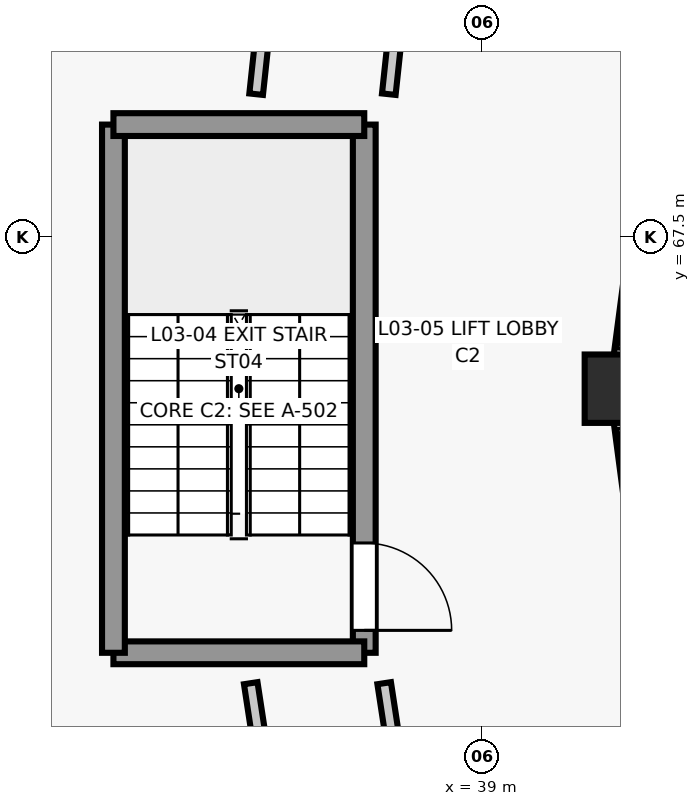
"""IFC4 building model, lengths in metres.
Left out: names, types, materials, properties, quantities, classifications, styles, units other than length and angle.
Written with IfcOpenShell. Run it as: python <this file> out.ifc"""

import sys

from ifc_helpers import new_model, si_unit, direction, frame, frame_2d, origin, origin_2d, place, context, subcontext, project, spatial, rectangle, circle, extrude, element, fill, save


model = new_model("IFC4")
c1 = context("Model", 3, precision=1e-05, world=origin(), true_north=direction((0.0, 1.0)))
c2 = subcontext(c1, "Body", "Model", "MODEL_VIEW")
j1 = project(units=[si_unit("LENGTHUNIT", "METRE"), si_unit("PLANEANGLEUNIT", "RADIAN")], contexts=[c1])
p1 = place(None, origin())
s1 = spatial("IfcSite", under=j1, at=p1, CompositionType="ELEMENT")
p2 = place(p1, origin())
s2 = spatial("IfcBuilding", under=s1, at=p2, CompositionType="ELEMENT")
p3 = place(p2, frame((0.0, 0.0, 12.6)))
s3 = spatial("IfcBuildingStorey", under=s2, at=p3, CompositionType="ELEMENT", Elevation=12.6)
p4 = place(p3, frame((40.8, 65.5, 0.0), z_axis=(0.0, 0.0, 1.0), x_axis=(1.0, 0.0, 0.0)))
e1 = element("IfcColumn", 1, at=p4, inside=s3, PredefinedType="COLUMN", context=c2, shape_type="SweptSolid", body=[
    extrude(circle(Radius=0.45, at=origin_2d()), origin(), (0.0, 0.0, 1.0), 3.9),
])
p5 = place(p3, frame((31.963, 65.975, 0.0), z_axis=(0.0, 0.0, 1.0), x_axis=(0.130513242145, 0.991446566197, 0.0)))
e2 = element("IfcWall", 2, at=p5, inside=s3, PredefinedType="STANDARD", context=c2, shape_type="SweptSolid", body=[
    extrude(rectangle(XDim=11.076, YDim=0.28, at=frame_2d((5.538, 0.0))), origin(), (0.0, 0.0, 1.0), 0.82),
])
p6 = place(p3, frame((42.031, 74.853, 0.0), z_axis=(0.0, 0.0, 1.0), x_axis=(-0.130549698469, -0.991441766434, 0.0)))
e3 = element("IfcWall", 3, at=p6, inside=s3, PredefinedType="STANDARD", context=c2, shape_type="SweptSolid", body=[
    extrude(rectangle(XDim=9.156, YDim=0.25, at=frame_2d((4.578, 0.0))), origin(), (0.0, 0.0, 1.0), 0.82),
])
p7 = place(p3, frame((33.408, 54.044, 0.0), z_axis=(0.0, 0.0, 1.0), x_axis=(-0.130513242145, 0.991446566197, 0.0)))
e4 = element("IfcWall", 4, at=p7, inside=s3, PredefinedType="STANDARD", context=c2, shape_type="SweptSolid", body=[
    extrude(rectangle(XDim=11.076, YDim=0.28, at=frame_2d((5.538, 0.0))), origin(), (0.0, 0.0, 1.0), 2.805),
])
p8 = place(p7, frame((4.563, 0.0, 0.85)))
e5 = element("IfcOpeningElement", 5, at=p8, cuts=e4, PredefinedType="OPENING", context=c2, shape_type="SweptSolid", body=[
    extrude(rectangle(XDim=1.95, YDim=1.55, at=frame_2d((0.975, 0.775))), frame((0.0, 0.15, 0.0), z_axis=(0.0, -1.0, 0.0), x_axis=(1.0, 0.0, 0.0)), (0.0, 0.0, 1.0), 0.3),
])
p9 = place(p3, frame((40.836, 65.225, 0.0), z_axis=(0.0, 0.0, 1.0), x_axis=(0.130549698469, -0.991441766434, 0.0)))
e6 = element("IfcWall", 6, at=p9, inside=s3, PredefinedType="STANDARD", context=c2, shape_type="SweptSolid", body=[
    extrude(rectangle(XDim=9.156, YDim=0.25, at=frame_2d((4.578, 0.0))), origin(), (0.0, 0.0, 1.0), 0.82),
])
p10 = place(p3, frame((37.45, 68.975, 0.0), z_axis=(0.0, 0.0, 1.0), x_axis=(0.0, -1.0, 0.0)))
e7 = element("IfcWall", 7, at=p10, inside=s3, PredefinedType="SHEAR", context=c2, shape_type="SweptSolid", body=[
    extrude(rectangle(XDim=6.95, YDim=0.3, at=frame_2d((3.475, 0.0))), origin(), (0.0, 0.0, 1.0), 3.9),
])
p11 = place(p10, frame((5.505, 0.0, 0.0)))
e8 = element("IfcOpeningElement", 8, at=p11, cuts=e7, PredefinedType="OPENING", context=c2, shape_type="SweptSolid", body=[
    extrude(rectangle(XDim=1.15, YDim=2.15, at=frame_2d((0.575, 1.075))), frame((0.0, 0.16, 0.0), z_axis=(0.0, -1.0, 0.0), x_axis=(1.0, 0.0, 0.0)), (0.0, 0.0, 1.0), 0.32),
])
p12 = place(p3, frame((37.45, 62.025, 0.0), z_axis=(0.0, 0.0, 1.0), x_axis=(-1.0, 0.0, 0.0)))
e9 = element("IfcWall", 9, at=p12, inside=s3, PredefinedType="SHEAR", context=c2, shape_type="SweptSolid", body=[
    extrude(rectangle(XDim=3.3, YDim=0.3, at=frame_2d((1.65, 0.0))), origin(), (0.0, 0.0, 1.0), 3.9),
])
p13 = place(p3, frame((34.15, 62.025, 0.0), z_axis=(0.0, 0.0, 1.0), x_axis=(0.0, 1.0, 0.0)))
e10 = element("IfcWall", 10, at=p13, inside=s3, PredefinedType="SHEAR", context=c2, shape_type="SweptSolid", body=[
    extrude(rectangle(XDim=6.95, YDim=0.3, at=frame_2d((3.475, 0.0))), origin(), (0.0, 0.0, 1.0), 3.9),
])
p14 = place(p3, frame((34.15, 68.975, 0.0), z_axis=(0.0, 0.0, 1.0), x_axis=(1.0, 0.0, 0.0)))
e11 = element("IfcWall", 11, at=p14, inside=s3, PredefinedType="SHEAR", context=c2, shape_type="SweptSolid", body=[
    extrude(rectangle(XDim=3.3, YDim=0.3, at=frame_2d((1.65, 0.0))), origin(), (0.0, 0.0, 1.0), 3.9),
])
p15 = place(p3, frame((36.674, 75.421, 0.0), z_axis=(0.0, 0.0, 1.0), x_axis=(-0.106354502234, -0.994328275699, 0.0)))
e12 = element("IfcWall", 12, at=p15, inside=s3, PredefinedType="PARTITIONING", context=c2, shape_type="SweptSolid", body=[
    extrude(rectangle(XDim=6.081, YDim=0.18, at=frame_2d((3.041, 0.0))), origin(), (0.0, 0.0, 1.0), 3.595),
])
p16 = place(p15, frame((2.44, 0.0, 0.0)))
e13 = element("IfcOpeningElement", 13, at=p16, cuts=e12, PredefinedType="OPENING", context=c2, shape_type="SweptSolid", body=[
    extrude(rectangle(XDim=1.2, YDim=2.15, at=frame_2d((0.6, 1.075))), frame((0.0, 0.1, 0.0), z_axis=(0.0, -1.0, 0.0), x_axis=(1.0, 0.0, 0.0)), (0.0, 0.0, 1.0), 0.2),
])
p17 = place(p3, frame((38.376, 75.013, 0.0), z_axis=(0.0, 0.0, 1.0), x_axis=(-0.10635220405, -0.994328521513, 0.0)))
e14 = element("IfcWall", 14, at=p17, inside=s3, PredefinedType="PARTITIONING", context=c2, shape_type="SweptSolid", body=[
    extrude(rectangle(XDim=5.67, YDim=0.18, at=frame_2d((2.835, 0.0))), origin(), (0.0, 0.0, 1.0), 3.595),
])
p18 = place(p17, frame((2.085, 0.0, 0.0)))
e15 = element("IfcOpeningElement", 15, at=p18, cuts=e14, PredefinedType="OPENING", context=c2, shape_type="SweptSolid", body=[
    extrude(rectangle(XDim=1.5, YDim=2.15, at=frame_2d((0.75, 1.075))), frame((0.0, 0.1, 0.0), z_axis=(0.0, -1.0, 0.0), x_axis=(1.0, 0.0, 0.0)), (0.0, 0.0, 1.0), 0.2),
])
p19 = place(p3, frame((35.957, 61.625, 0.0), z_axis=(0.0, 0.0, 1.0), x_axis=(0.151056084549, -0.988525194075, 0.0)))
e16 = element("IfcWall", 16, at=p19, inside=s3, PredefinedType="PARTITIONING", context=c2, shape_type="SweptSolid", body=[
    extrude(rectangle(XDim=7.991, YDim=0.18, at=frame_2d((3.995, 0.0))), origin(), (0.0, 0.0, 1.0), 3.595),
])
p20 = place(p19, frame((3.27, 0.0, 0.0)))
e17 = element("IfcOpeningElement", 17, at=p20, cuts=e16, PredefinedType="OPENING", context=c2, shape_type="SweptSolid", body=[
    extrude(rectangle(XDim=1.45, YDim=2.2, at=frame_2d((0.725, 1.1))), frame((0.0, 0.1, 0.0), z_axis=(0.0, -1.0, 0.0), x_axis=(1.0, 0.0, 0.0)), (0.0, 0.0, 1.0), 0.2),
])
p21 = place(p3, frame((37.712, 61.625, 0.0), z_axis=(0.0, 0.0, 1.0), x_axis=(0.151034676109, -0.988528465252, 0.0)))
e18 = element("IfcWall", 18, at=p21, inside=s3, PredefinedType="PARTITIONING", context=c2, shape_type="SweptSolid", body=[
    extrude(rectangle(XDim=7.5, YDim=0.18, at=frame_2d((3.75, 0.0))), origin(), (0.0, 0.0, 1.0), 3.595),
])
p22 = place(p21, frame((3.275, 0.0, 0.0)))
e19 = element("IfcOpeningElement", 19, at=p22, cuts=e18, PredefinedType="OPENING", context=c2, shape_type="SweptSolid", body=[
    extrude(rectangle(XDim=0.95, YDim=2.1, at=frame_2d((0.475, 1.05))), frame((0.0, 0.1, 0.0), z_axis=(0.0, -1.0, 0.0), x_axis=(1.0, 0.0, 0.0)), (0.0, 0.0, 1.0), 0.2),
])
p23 = place(p11, origin())
e20 = element("IfcDoor", 20, at=p23, inside=s3, OperationType="SINGLE_SWING_RIGHT", PredefinedType="DOOR", context=c2, shape_type="SweptSolid", body=[
    extrude(rectangle(XDim=1.15, YDim=2.15, at=frame_2d((0.575, 1.075))), frame((0.0, 0.025, 0.0), z_axis=(0.0, -1.0, 0.0), x_axis=(1.0, 0.0, 0.0)), (0.0, 0.0, 1.0), 0.05),
])
fill(e8, e20)
save(model, sys.argv[1])
